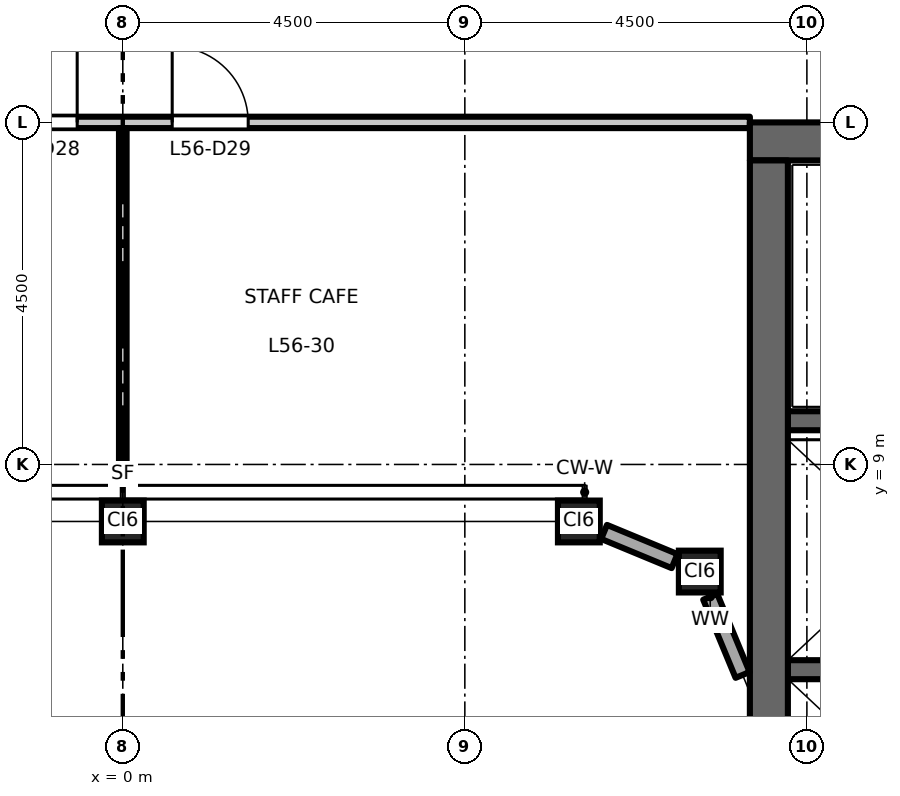
"""IFC4 building model, lengths in metres.
Left out: names, types, materials, properties, quantities, classifications, styles, units other than length and angle.
Written with IfcOpenShell. Run it as: python <this file> out.ifc"""

import sys

from ifc_helpers import new_model, si_unit, direction, frame, frame_2d, origin, origin_2d, place, context, subcontext, project, spatial, rectangle, hollow_rectangle, extrude, element, fill, save


model = new_model("IFC4")
c1 = context("Model", 3, precision=1e-05, world=origin(), true_north=direction((0.0, 1.0)))
c2 = subcontext(c1, "Body", "Model", "MODEL_VIEW")
j1 = project(units=[si_unit("LENGTHUNIT", "METRE"), si_unit("PLANEANGLEUNIT", "RADIAN")], contexts=[c1])
p1 = place(None, origin())
s1 = spatial("IfcSite", under=j1, at=p1, CompositionType="ELEMENT")
p2 = place(p1, origin())
s2 = spatial("IfcBuilding", under=s1, at=p2, CompositionType="ELEMENT")
p3 = place(p2, frame((0.0, 0.0, 260.2)))
s3 = spatial("IfcBuildingStorey", under=s2, at=p3, CompositionType="ELEMENT", Elevation=260.2)
for number, where, z_axis, x_axis in (
    (1, (0.0, 8.25, 0.0), (0.0, 0.0, 1.0), (1.0, 0.0, 0.0)),
    (2, (6.0, 8.25, 0.0), (0.0, 0.0, 1.0), (1.0, 0.0, 0.0)),
    (3, (7.591, 7.591, 0.0), (0.0, 0.0, 1.0), (1.0, 0.0, 0.0)),
):
    element("IfcColumn", number, at=place(p3, frame(where, z_axis=z_axis, x_axis=x_axis)), inside=s3, PredefinedType="COLUMN", context=c2, shape_type="SweptSolid", body=[
        extrude(hollow_rectangle(XDim=0.55, YDim=0.55, WallThickness=0.028, at=origin_2d()), origin(), (0.0, 0.0, 1.0), 4.5),
    ])
p4 = place(p3, frame((8.75, 6.3, 0.0), z_axis=(0.0, 0.0, 1.0), x_axis=(1.0, 0.0, 0.0)))
e4 = element("IfcWall", 4, at=p4, inside=s3, PredefinedType="SHEAR", context=c2, shape_type="SweptSolid", body=[
    extrude(rectangle(XDim=3.1, YDim=0.25, at=frame_2d((1.55, 0.0))), origin(), (0.0, 0.0, 1.0), 4.35),
])
p5 = place(p3, frame((8.75, 9.575, 0.0), z_axis=(0.0, 0.0, 1.0), x_axis=(1.0, 0.0, 0.0)))
e5 = element("IfcWall", 5, at=p5, inside=s3, PredefinedType="SHEAR", context=c2, shape_type="SweptSolid", body=[
    extrude(rectangle(XDim=8.0, YDim=0.25, at=frame_2d((4.0, 0.0))), origin(), (0.0, 0.0, 1.0), 4.35),
])
p6 = place(p5, frame((6.65, 0.0, 0.0)))
e6 = element("IfcOpeningElement", 6, at=p6, cuts=e5, PredefinedType="OPENING", context=c2, shape_type="SweptSolid", body=[
    extrude(rectangle(XDim=1.1, YDim=2.1, at=frame_2d((0.55, 1.05))), frame((0.0, 0.135, 0.0), z_axis=(0.0, -1.0, 0.0), x_axis=(1.0, 0.0, 0.0)), (0.0, 0.0, 1.0), 0.27),
])
p7 = place(p3, frame((8.25, 13.25, 0.0), z_axis=(0.0, 0.0, 1.0), x_axis=(1.0, 0.0, 0.0)))
e7 = element("IfcWall", 7, at=p7, inside=s3, PredefinedType="SHEAR", context=c2, shape_type="SweptSolid", body=[
    extrude(rectangle(XDim=13.5, YDim=0.5, at=frame_2d((6.75, 0.0))), origin(), (0.0, 0.0, 1.0), 4.35),
])
p8 = place(p3, frame((8.5, -13.0, 0.0), z_axis=(0.0, 0.0, 1.0), x_axis=(0.0, 1.0, 0.0)))
e8 = element("IfcWall", 8, at=p8, inside=s3, PredefinedType="SHEAR", context=c2, shape_type="SweptSolid", body=[
    extrude(rectangle(XDim=26.0, YDim=0.5, at=frame_2d((13.0, 0.0))), origin(), (0.0, 0.0, 1.0), 4.35),
])
p9 = place(p3, frame((8.154, 6.231, 0.0), z_axis=(0.0, 0.0, 1.0), x_axis=(-0.382635994082, 0.923899180665, 0.0)))
e9 = element("IfcWall", 9, at=p9, inside=s3, PredefinedType="STANDARD", context=c2, shape_type="SweptSolid", body=[
    extrude(rectangle(XDim=1.113, YDim=0.2, at=frame_2d((0.556, 0.0))), origin(), (0.0, 0.0, 1.0), 3.918),
])
p10 = place(p3, frame((7.259, 7.729, 0.0), z_axis=(0.0, 0.0, 1.0), x_axis=(-0.923859650767, 0.382731427616, 0.0)))
e10 = element("IfcWall", 10, at=p10, inside=s3, PredefinedType="STANDARD", context=c2, shape_type="SweptSolid", body=[
    extrude(rectangle(XDim=1.003, YDim=0.2, at=frame_2d((0.502, 0.0))), origin(), (0.0, 0.0, 1.0), 3.918),
])
p11 = place(p3, frame((-8.25, 13.5, 0.0), z_axis=(0.0, 0.0, 1.0), x_axis=(1.0, 0.0, 0.0)))
e11 = element("IfcWall", 11, at=p11, inside=s3, PredefinedType="PARTITIONING", context=c2, shape_type="SweptSolid", body=[
    extrude(rectangle(XDim=16.5, YDim=0.15, at=frame_2d((8.25, 0.0))), origin(), (0.0, 0.0, 1.0), 4.35),
])
p12 = place(p11, frame((6.65, 0.0, 0.0)))
e12 = element("IfcOpeningElement", 12, at=p12, cuts=e11, PredefinedType="OPENING", context=c2, shape_type="SweptSolid", body=[
    extrude(rectangle(XDim=1.0, YDim=2.1, at=frame_2d((0.5, 1.05))), frame((0.0, 0.085, 0.0), z_axis=(0.0, -1.0, 0.0), x_axis=(1.0, 0.0, 0.0)), (0.0, 0.0, 1.0), 0.17),
])
p13 = place(p11, frame((8.9, 0.0, 0.0)))
e13 = element("IfcOpeningElement", 13, at=p13, cuts=e11, PredefinedType="OPENING", context=c2, shape_type="SweptSolid", body=[
    extrude(rectangle(XDim=1.0, YDim=2.1, at=frame_2d((0.5, 1.05))), frame((0.0, 0.085, 0.0), z_axis=(0.0, -1.0, 0.0), x_axis=(1.0, 0.0, 0.0)), (0.0, 0.0, 1.0), 0.17),
])
p14 = place(p3, frame((0.0, 8.6, 0.0), z_axis=(0.0, 0.0, 1.0), x_axis=(0.0, 1.0, 0.0)))
e14 = element("IfcWall", 14, at=p14, inside=s3, PredefinedType="PARTITIONING", context=c2, shape_type="SweptSolid", body=[
    extrude(rectangle(XDim=4.825, YDim=0.1, at=frame_2d((2.413, 0.0))), origin(), (0.0, 0.0, 1.0), 3.55),
])
p15 = place(p12, origin())
e15 = element("IfcDoor", 15, at=p15, inside=s3, OperationType="SINGLE_SWING_RIGHT", PredefinedType="DOOR", context=c2, shape_type="SweptSolid", body=[
    extrude(rectangle(XDim=1.0, YDim=2.1, at=frame_2d((0.5, 1.05))), frame((0.0, 0.025, 0.0), z_axis=(0.0, -1.0, 0.0), x_axis=(1.0, 0.0, 0.0)), (0.0, 0.0, 1.0), 0.05),
])
fill(e12, e15)
p16 = place(p13, origin())
e16 = element("IfcDoor", 16, at=p16, inside=s3, OperationType="SINGLE_SWING_LEFT", PredefinedType="DOOR", context=c2, shape_type="SweptSolid", body=[
    extrude(rectangle(XDim=1.0, YDim=2.1, at=frame_2d((0.5, 1.05))), frame((0.0, 0.025, 0.0), z_axis=(0.0, -1.0, 0.0), x_axis=(1.0, 0.0, 0.0)), (0.0, 0.0, 1.0), 0.05),
])
fill(e13, e16)
save(model, sys.argv[1])
